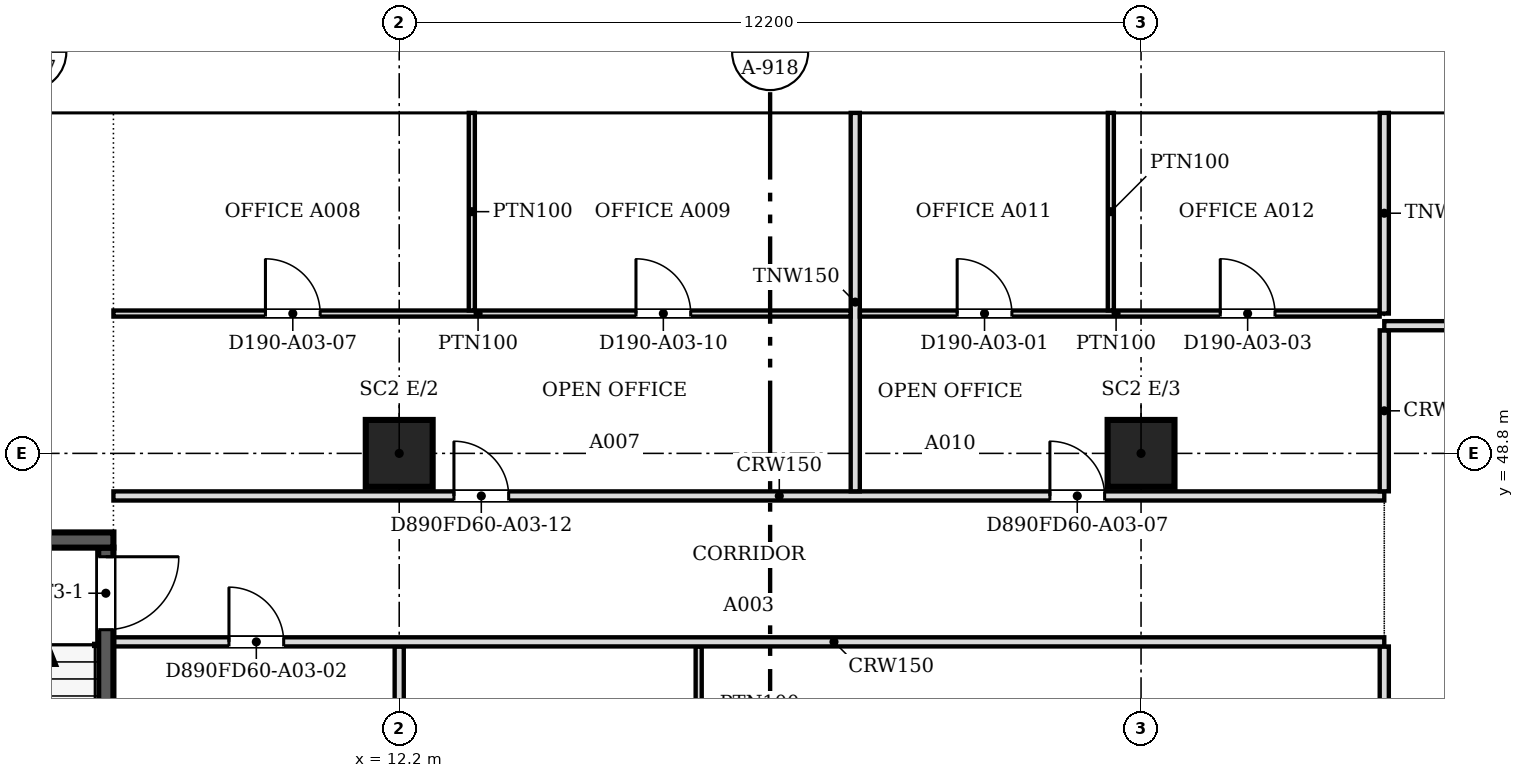
"""IFC4 building model, lengths in metres.
Left out: names, types, materials, properties, quantities, classifications, styles, units other than length and angle.
Written with IfcOpenShell. Run it as: python <this file> out.ifc"""

import sys

from ifc_helpers import new_model, si_unit, direction, frame, frame_2d, origin, origin_2d, place, context, subcontext, project, spatial, polyline, rectangle, outline, extrude, faceted_brep, source, transform, mapped, element, fill, save


model = new_model("IFC4")
c1 = context("Model", 3, precision=1e-05, world=origin(), true_north=direction((0.0, 1.0)))
c2 = subcontext(c1, "Body", "Model", "MODEL_VIEW")
j1 = project(units=[si_unit("LENGTHUNIT", "METRE"), si_unit("PLANEANGLEUNIT", "RADIAN")], contexts=[c1])
p1 = place(None, origin())
s1 = spatial("IfcSite", under=j1, at=p1, CompositionType="ELEMENT")
p2 = place(p1, origin())
s2 = spatial("IfcBuilding", under=s1, at=p2, CompositionType="ELEMENT")
p3 = place(p2, frame((0.0, 0.0, 37.2)))
s3 = spatial("IfcBuildingStorey", under=s2, at=p3, CompositionType="ELEMENT", Elevation=37.2)
for number, where, z_axis, x_axis in (
    (1, (12.2, 48.8, 0.0), (0.0, 0.0, 1.0), (1.0, 0.0, 0.0)),
    (2, (24.4, 48.8, 0.0), (0.0, 0.0, 1.0), (1.0, 0.0, 0.0)),
):
    element("IfcColumn", number, at=place(p3, frame(where, z_axis=z_axis, x_axis=x_axis)), inside=s3, PredefinedType="COLUMN", context=c2, shape_type="SweptSolid", body=[
        extrude(rectangle(XDim=1.1, YDim=1.1, at=origin_2d()), origin(), (0.0, 0.0, 1.0), 3.6),
    ])
m1 = source(origin(), c2, "Body", "SweptSolid", [
    extrude(outline(polyline([(3.05, 0.0), (6.1, 3.8), (3.05, 7.6), (0.0, 3.8), (3.05, 0.0)])), frame((0.0, 0.25, 0.0), z_axis=(0.0, -1.0, 0.0), x_axis=(1.0, 0.0, 0.0)), (0.0, 0.0, 1.0), 0.5),
])
p4 = place(p3, frame((30.5, 54.65, -3.8), z_axis=(0.0, 0.0, 1.0), x_axis=(-1.0, 0.0, 0.0)))
e3 = element("IfcWall", 3, at=p4, inside=s3, PredefinedType="SOLIDWALL", context=c2, shape_type="MappedRepresentation", body=[
    mapped(m1, transform((0.0, 0.0, 0.0), scale=1.0)),
])
m2 = source(origin(), c2, "Body", "SweptSolid", [
    extrude(outline(polyline([(3.05, 0.399), (5.78, 3.8), (3.05, 7.201), (0.321, 3.8), (3.05, 0.399)])), frame((0.0, 0.26, 0.0), z_axis=(0.0, -1.0, 0.0), x_axis=(1.0, 0.0, 0.0)), (0.0, 0.0, 1.0), 0.52),
])
p5 = place(p4, origin())
e4 = element("IfcOpeningElement", 4, at=p5, cuts=e3, PredefinedType="OPENING", context=c2, shape_type="MappedRepresentation", body=[
    mapped(m2, transform((0.0, 0.0, 0.0), scale=1.0)),
])
m3 = source(origin(), c2, "Body", "Brep", [
    faceted_brep([(3.05, -0.25, 0.0), (6.1, -0.25, 3.8), (6.1, -0.25, 3.8), (3.05, -0.25, 7.6), (0.0, -0.25, 3.8), (0.0, 0.25, 3.8), (3.05, 0.25, 7.6), (6.1, 0.25, 3.8), (6.1, 0.25, 3.8), (3.05, 0.25, 0.0)], [[[0, 1, 2, 3, 4]], [[5, 6, 7, 8, 9]], [[9, 8, 1, 0]], [[7, 6, 3, 2]], [[6, 5, 4, 3]], [[5, 9, 0, 4]], [[1, 8, 7, 2]]]),
])
p6 = place(p3, frame((24.4, 54.65, -3.8), z_axis=(0.0, 0.0, 1.0), x_axis=(-1.0, 0.0, 0.0)))
e5 = element("IfcWall", 5, at=p6, inside=s3, PredefinedType="SOLIDWALL", context=c2, shape_type="MappedRepresentation", body=[
    mapped(m3, transform((0.0, 0.0, 0.0), scale=1.0)),
])
p7 = place(p6, origin())
e6 = element("IfcOpeningElement", 6, at=p7, cuts=e5, PredefinedType="OPENING", context=c2, shape_type="MappedRepresentation", body=[
    mapped(m2, transform((0.0, 0.0, 0.0), scale=1.0)),
])
p8 = place(p3, frame((18.3, 54.65, -3.8), z_axis=(0.0, 0.0, 1.0), x_axis=(-1.0, 0.0, 0.0)))
e7 = element("IfcWall", 7, at=p8, inside=s3, PredefinedType="SOLIDWALL", context=c2, shape_type="MappedRepresentation", body=[
    mapped(m1, transform((0.0, 0.0, 0.0), scale=1.0)),
])
p9 = place(p8, origin())
e8 = element("IfcOpeningElement", 8, at=p9, cuts=e7, PredefinedType="OPENING", context=c2, shape_type="MappedRepresentation", body=[
    mapped(m2, transform((0.0, 0.0, 0.0), scale=1.0)),
])
m4 = source(origin(), c2, "Body", "Brep", [
    faceted_brep([(3.05, -0.25, 0.0), (6.053, -0.25, 3.8), (3.05, -0.25, 7.6), (0.0, -0.25, 3.8), (0.0, 0.25, 3.8), (3.05, 0.25, 7.6), (6.007, 0.25, 3.859), (6.007, 0.25, 3.741), (3.05, 0.25, 0.0), (6.053, 0.0, 3.8)], [[[0, 1, 2, 3]], [[4, 5, 6, 7, 8]], [[8, 7, 9, 1, 0]], [[6, 5, 2, 1, 9]], [[5, 4, 3, 2]], [[4, 8, 0, 3]], [[9, 7, 6]]]),
])
p10 = place(p3, frame((12.2, 54.65, -3.8), z_axis=(0.0, 0.0, 1.0), x_axis=(-1.0, 0.0, 0.0)))
e9 = element("IfcWall", 9, at=p10, inside=s3, PredefinedType="SOLIDWALL", context=c2, shape_type="MappedRepresentation", body=[
    mapped(m4, transform((0.0, 0.0, 0.0), scale=1.0)),
])
m5 = source(origin(), c2, "Body", "SweptSolid", [
    extrude(outline(polyline([(3.049, 0.401), (5.735, 3.8), (3.049, 7.199), (0.321, 3.8), (3.049, 0.401)])), frame((0.0, 0.26, 0.0), z_axis=(0.0, -1.0, 0.0), x_axis=(1.0, 0.0, 0.0)), (0.0, 0.0, 1.0), 0.52),
])
p11 = place(p10, origin())
e10 = element("IfcOpeningElement", 10, at=p11, cuts=e9, PredefinedType="OPENING", context=c2, shape_type="MappedRepresentation", body=[
    mapped(m5, transform((0.0, 0.0, 0.0), scale=1.0)),
])
p12 = place(p2, frame((0.0, 0.0, 41.0)))
s4 = spatial("IfcBuildingStorey", under=s2, at=p12, CompositionType="ELEMENT", Elevation=41.0)
p13 = place(p12, frame((33.55, 54.65, -3.8), z_axis=(0.0, 0.0, 1.0), x_axis=(-1.0, 0.0, 0.0)))
e11 = element("IfcWall", 11, at=p13, inside=s4, PredefinedType="SOLIDWALL", context=c2, shape_type="MappedRepresentation", body=[
    mapped(m1, transform((0.0, 0.0, 0.0), scale=1.0)),
])
p14 = place(p13, origin())
e12 = element("IfcOpeningElement", 12, at=p14, cuts=e11, PredefinedType="OPENING", context=c2, shape_type="MappedRepresentation", body=[
    mapped(m2, transform((0.0, 0.0, 0.0), scale=1.0)),
])
p15 = place(p12, frame((27.45, 54.65, -3.8), z_axis=(0.0, 0.0, 1.0), x_axis=(-1.0, 0.0, 0.0)))
e13 = element("IfcWall", 13, at=p15, inside=s4, PredefinedType="SOLIDWALL", context=c2, shape_type="MappedRepresentation", body=[
    mapped(m3, transform((0.0, 0.0, 0.0), scale=1.0)),
])
p16 = place(p15, origin())
e14 = element("IfcOpeningElement", 14, at=p16, cuts=e13, PredefinedType="OPENING", context=c2, shape_type="MappedRepresentation", body=[
    mapped(m2, transform((0.0, 0.0, 0.0), scale=1.0)),
])
p17 = place(p12, frame((21.35, 54.65, -3.8), z_axis=(0.0, 0.0, 1.0), x_axis=(-1.0, 0.0, 0.0)))
e15 = element("IfcWall", 15, at=p17, inside=s4, PredefinedType="SOLIDWALL", context=c2, shape_type="MappedRepresentation", body=[
    mapped(m1, transform((0.0, 0.0, 0.0), scale=1.0)),
])
p18 = place(p17, origin())
e16 = element("IfcOpeningElement", 16, at=p18, cuts=e15, PredefinedType="OPENING", context=c2, shape_type="MappedRepresentation", body=[
    mapped(m2, transform((0.0, 0.0, 0.0), scale=1.0)),
])
p19 = place(p12, frame((15.25, 54.65, -3.8), z_axis=(0.0, 0.0, 1.0), x_axis=(-1.0, 0.0, 0.0)))
e17 = element("IfcWall", 17, at=p19, inside=s4, PredefinedType="SOLIDWALL", context=c2, shape_type="MappedRepresentation", body=[
    mapped(m1, transform((0.0, 0.0, 0.0), scale=1.0)),
])
p20 = place(p19, origin())
e18 = element("IfcOpeningElement", 18, at=p20, cuts=e17, PredefinedType="OPENING", context=c2, shape_type="MappedRepresentation", body=[
    mapped(m2, transform((0.0, 0.0, 0.0), scale=1.0)),
])
m6 = source(origin(), c2, "Body", "Brep", [
    faceted_brep([(3.003, -0.25, 0.0), (3.05, -0.25, 0.06), (3.05, -0.25, 7.54), (3.003, -0.25, 7.6), (0.0, -0.25, 3.8), (0.0, 0.25, 3.8), (2.957, 0.25, 7.541), (2.957, 0.25, 0.059), (3.003, 0.0, 0.0), (3.003, 0.0, 7.6)], [[[0, 1, 2, 3, 4]], [[5, 6, 7]], [[1, 0, 8]], [[9, 3, 2]], [[6, 5, 4, 3, 9]], [[5, 7, 8, 0, 4]], [[1, 8, 7, 6, 9, 2]]]),
])
p21 = place(p12, frame((9.15, 54.65, -3.8), z_axis=(0.0, 0.0, 1.0), x_axis=(-1.0, 0.0, 0.0)))
e19 = element("IfcWall", 19, at=p21, inside=s4, PredefinedType="SOLIDWALL", context=c2, shape_type="MappedRepresentation", body=[
    mapped(m6, transform((0.0, 0.0, 0.0), scale=1.0)),
])
m7 = source(origin(), c2, "Body", "SweptSolid", [
    extrude(outline(polyline([(2.803, 6.944), (0.319, 3.8), (2.803, 0.656), (2.803, 6.944)])), frame((0.0, 0.26, 0.0), z_axis=(0.0, -1.0, 0.0), x_axis=(1.0, 0.0, 0.0)), (0.0, 0.0, 1.0), 0.52),
])
p22 = place(p21, origin())
e20 = element("IfcOpeningElement", 20, at=p22, cuts=e19, PredefinedType="OPENING", context=c2, shape_type="MappedRepresentation", body=[
    mapped(m7, transform((0.0, 0.0, 0.0), scale=1.0)),
])
p23 = place(p3, frame((3.6, 47.375, 0.0), z_axis=(0.0, 0.0, 1.0), x_axis=(1.0, 0.0, 0.0)))
e21 = element("IfcWall", 21, at=p23, inside=s3, PredefinedType="SOLIDWALL", context=c2, shape_type="SweptSolid", body=[
    extrude(rectangle(XDim=3.9, YDim=0.25, at=frame_2d((1.95, 0.0))), origin(), (0.0, 0.0, 1.0), 3.8),
])
p24 = place(p3, frame((7.375, 47.25, 0.0), z_axis=(0.0, 0.0, 1.0), x_axis=(0.0, -1.0, 0.0)))
e22 = element("IfcWall", 22, at=p24, inside=s3, PredefinedType="SOLIDWALL", context=c2, shape_type="SweptSolid", body=[
    extrude(rectangle(XDim=8.0, YDim=0.25, at=frame_2d((4.0, 0.0))), origin(), (0.0, 0.0, 1.0), 3.8),
])
m8 = source(origin(), c2, "Body", "SweptSolid", [
    extrude(rectangle(XDim=1.2, YDim=2.1, at=frame_2d((0.6, 1.05))), frame((0.0, 0.135, 0.0), z_axis=(0.0, -1.0, 0.0), x_axis=(1.0, 0.0, 0.0)), (0.0, 0.0, 1.0), 0.27),
])
p25 = place(p24, frame((0.15, 0.0, 0.0)))
e23 = element("IfcOpeningElement", 23, at=p25, cuts=e22, PredefinedType="OPENING", context=c2, shape_type="MappedRepresentation", body=[
    mapped(m8, transform((0.0, 0.0, 0.0), scale=1.0)),
])
p26 = place(p3, frame((28.4, 18.8, 0.0), z_axis=(0.0, 0.0, 1.0), x_axis=(0.0, 1.0, 0.0)))
e24 = element("IfcWall", 24, at=p26, inside=s3, PredefinedType="PARTITIONING", context=c2, shape_type="SweptSolid", body=[
    extrude(rectangle(XDim=26.824, YDim=0.15, at=frame_2d((13.412, 0.0))), origin(), (0.0, 0.0, 1.0), 3.067),
])
m9 = source(origin(), c2, "Body", "SweptSolid", [
    extrude(rectangle(XDim=0.9, YDim=2.1, at=frame_2d((0.45, 1.05))), frame((0.0, 0.085, 0.0), z_axis=(0.0, -1.0, 0.0), x_axis=(1.0, 0.0, 0.0)), (0.0, 0.0, 1.0), 0.17),
])
p27 = place(p26, frame((1.3, 0.0, 0.0)))
e25 = element("IfcOpeningElement", 25, at=p27, cuts=e24, PredefinedType="OPENING", context=c2, shape_type="MappedRepresentation", body=[
    mapped(m9, transform((0.0, 0.0, 0.0), scale=1.0)),
])
p28 = place(p26, frame((14.301, 0.0, 0.0)))
e26 = element("IfcOpeningElement", 26, at=p28, cuts=e24, PredefinedType="OPENING", context=c2, shape_type="MappedRepresentation", body=[
    mapped(m9, transform((0.0, 0.0, 0.0), scale=1.0)),
])
p29 = place(p26, frame((8.2, 0.0, 0.0)))
e27 = element("IfcOpeningElement", 27, at=p29, cuts=e24, PredefinedType="OPENING", context=c2, shape_type="MappedRepresentation", body=[
    mapped(m9, transform((0.0, 0.0, 0.0), scale=1.0)),
])
p30 = place(p26, frame((21.9, 0.0, 0.0)))
e28 = element("IfcOpeningElement", 28, at=p30, cuts=e24, PredefinedType="OPENING", context=c2, shape_type="MappedRepresentation", body=[
    mapped(m9, transform((0.0, 0.0, 0.0), scale=1.0)),
])
p31 = place(p3, frame((12.2, 37.151, 0.0), z_axis=(0.0, 0.0, 1.0), x_axis=(0.0, 1.0, 0.0)))
e29 = element("IfcWall", 29, at=p31, inside=s3, PredefinedType="PARTITIONING", context=c2, shape_type="SweptSolid", body=[
    extrude(rectangle(XDim=8.473, YDim=0.15, at=frame_2d((4.237, 0.0))), origin(), (0.0, 0.0, 1.0), 3.067),
])
p32 = place(p3, frame((17.125, 41.047, 0.0), z_axis=(0.0, 0.0, 1.0), x_axis=(0.0, 1.0, 0.0)))
e30 = element("IfcWall", 30, at=p32, inside=s3, PredefinedType="PARTITIONING", context=c2, shape_type="SweptSolid", body=[
    extrude(rectangle(XDim=4.577, YDim=0.1, at=frame_2d((2.289, 0.0))), origin(), (0.0, 0.0, 1.0), 3.067),
])
m10 = source(origin(), c2, "Body", "SweptSolid", [
    extrude(rectangle(XDim=0.9, YDim=2.1, at=frame_2d((0.45, 1.05))), frame((0.0, 0.06, 0.0), z_axis=(0.0, -1.0, 0.0), x_axis=(1.0, 0.0, 0.0)), (0.0, 0.0, 1.0), 0.12),
])
p33 = place(p32, frame((1.8, 0.0, 0.0)))
e31 = element("IfcOpeningElement", 31, at=p33, cuts=e30, PredefinedType="OPENING", context=c2, shape_type="MappedRepresentation", body=[
    mapped(m10, transform((0.0, 0.0, 0.0), scale=1.0)),
])
p34 = place(p3, frame((28.4, 45.7, 0.0), z_axis=(0.0, 0.0, 1.0), x_axis=(-1.0, 0.0, 0.0)))
e32 = element("IfcWall", 32, at=p34, inside=s3, PredefinedType="PARTITIONING", context=c2, shape_type="SweptSolid", body=[
    extrude(rectangle(XDim=20.9, YDim=0.15, at=frame_2d((10.45, 0.0))), origin(), (0.0, 0.0, 1.0), 3.067),
])
p35 = place(p34, frame((18.1, 0.0, 0.0)))
e33 = element("IfcOpeningElement", 33, at=p35, cuts=e32, PredefinedType="OPENING", context=c2, shape_type="MappedRepresentation", body=[
    mapped(m9, transform((0.0, 0.0, 0.0), scale=1.0)),
])
p36 = place(p3, frame((7.5, 48.1, 0.0), z_axis=(0.0, 0.0, 1.0), x_axis=(1.0, 0.0, 0.0)))
e34 = element("IfcWall", 34, at=p36, inside=s3, PredefinedType="PARTITIONING", context=c2, shape_type="SweptSolid", body=[
    extrude(rectangle(XDim=20.9, YDim=0.15, at=frame_2d((10.45, 0.0))), origin(), (0.0, 0.0, 1.0), 3.067),
])
p37 = place(p36, frame((15.401, 0.0, 0.0)))
e35 = element("IfcOpeningElement", 35, at=p37, cuts=e34, PredefinedType="OPENING", context=c2, shape_type="MappedRepresentation", body=[
    mapped(m9, transform((0.0, 0.0, 0.0), scale=1.0)),
])
p38 = place(p36, frame((5.6, 0.0, 0.0)))
e36 = element("IfcOpeningElement", 36, at=p38, cuts=e34, PredefinedType="OPENING", context=c2, shape_type="MappedRepresentation", body=[
    mapped(m9, transform((0.0, 0.0, 0.0), scale=1.0)),
])
p39 = place(p3, frame((19.7, 48.176, 0.0), z_axis=(0.0, 0.0, 1.0), x_axis=(0.0, 1.0, 0.0)))
e37 = element("IfcWall", 37, at=p39, inside=s3, PredefinedType="PARTITIONING", context=c2, shape_type="SweptSolid", body=[
    extrude(rectangle(XDim=6.224, YDim=0.15, at=frame_2d((3.112, 0.0))), origin(), (0.0, 0.0, 1.0), 3.067),
])
p40 = place(p3, frame((28.4, 48.176, 0.0), z_axis=(0.0, 0.0, 1.0), x_axis=(0.0, 1.0, 0.0)))
e38 = element("IfcWall", 38, at=p40, inside=s3, PredefinedType="PARTITIONING", context=c2, shape_type="SweptSolid", body=[
    extrude(rectangle(XDim=2.648, YDim=0.15, at=frame_2d((1.324, 0.0))), origin(), (0.0, 0.0, 1.0), 3.067),
])
p41 = place(p3, frame((28.4, 50.9, 0.0), z_axis=(0.0, 0.0, 1.0), x_axis=(1.0, 0.0, 0.0)))
e39 = element("IfcWall", 39, at=p41, inside=s3, PredefinedType="PARTITIONING", context=c2, shape_type="SweptSolid", body=[
    extrude(rectangle(XDim=31.254, YDim=0.15, at=frame_2d((15.627, 0.0))), origin(), (0.0, 0.0, 1.0), 3.067),
])
p42 = place(p41, frame((16.301, 0.0, 0.0)))
e40 = element("IfcOpeningElement", 40, at=p42, cuts=e39, PredefinedType="OPENING", context=c2, shape_type="MappedRepresentation", body=[
    mapped(m9, transform((0.0, 0.0, 0.0), scale=1.0)),
])
p43 = place(p41, frame((25.85, 0.0, 0.0)))
e41 = element("IfcOpeningElement", 41, at=p43, cuts=e39, PredefinedType="OPENING", context=c2, shape_type="MappedRepresentation", body=[
    mapped(m9, transform((0.0, 0.0, 0.0), scale=1.0)),
])
p44 = place(p41, frame((5.6, 0.0, 0.0)))
e42 = element("IfcOpeningElement", 42, at=p44, cuts=e39, PredefinedType="OPENING", context=c2, shape_type="MappedRepresentation", body=[
    mapped(m9, transform((0.0, 0.0, 0.0), scale=1.0)),
])
p45 = place(p3, frame((7.5, 51.1, 0.0), z_axis=(0.0, 0.0, 1.0), x_axis=(1.0, 0.0, 0.0)))
e43 = element("IfcWall", 43, at=p45, inside=s3, PredefinedType="PARTITIONING", context=c2, shape_type="SweptSolid", body=[
    extrude(rectangle(XDim=12.124, YDim=0.1, at=frame_2d((6.062, 0.0))), origin(), (0.0, 0.0, 1.0), 3.067),
])
p46 = place(p45, frame((2.5, 0.0, 0.0)))
e44 = element("IfcOpeningElement", 44, at=p46, cuts=e43, PredefinedType="OPENING", context=c2, shape_type="MappedRepresentation", body=[
    mapped(m10, transform((0.0, 0.0, 0.0), scale=1.0)),
])
p47 = place(p45, frame((8.594, 0.0, 0.0)))
e45 = element("IfcOpeningElement", 45, at=p47, cuts=e43, PredefinedType="OPENING", context=c2, shape_type="MappedRepresentation", body=[
    mapped(m10, transform((0.0, 0.0, 0.0), scale=1.0)),
])
p48 = place(p3, frame((19.776, 51.1, 0.0), z_axis=(0.0, 0.0, 1.0), x_axis=(1.0, 0.0, 0.0)))
e46 = element("IfcWall", 46, at=p48, inside=s3, PredefinedType="PARTITIONING", context=c2, shape_type="SweptSolid", body=[
    extrude(rectangle(XDim=8.548, YDim=0.1, at=frame_2d((4.274, 0.0))), origin(), (0.0, 0.0, 1.0), 3.067),
])
p49 = place(p48, frame((1.6, 0.0, 0.0)))
e47 = element("IfcOpeningElement", 47, at=p49, cuts=e46, PredefinedType="OPENING", context=c2, shape_type="MappedRepresentation", body=[
    mapped(m10, transform((0.0, 0.0, 0.0), scale=1.0)),
])
p50 = place(p48, frame((5.927, 0.0, 0.0)))
e48 = element("IfcOpeningElement", 48, at=p50, cuts=e46, PredefinedType="OPENING", context=c2, shape_type="MappedRepresentation", body=[
    mapped(m10, transform((0.0, 0.0, 0.0), scale=1.0)),
])
p51 = place(p3, frame((28.4, 51.1, 0.0), z_axis=(0.0, 0.0, 1.0), x_axis=(0.0, 1.0, 0.0)))
e49 = element("IfcWall", 49, at=p51, inside=s3, PredefinedType="PARTITIONING", context=c2, shape_type="SweptSolid", body=[
    extrude(rectangle(XDim=3.3, YDim=0.15, at=frame_2d((1.65, 0.0))), origin(), (0.0, 0.0, 1.0), 3.067),
])
for number, where, z_axis, x_axis in (
    (50, (13.394, 51.151, 0.0), (0.0, 0.0, 1.0), (0.0, 1.0, 0.0)),
    (51, (23.903, 51.151, 0.0), (0.0, 0.0, 1.0), (0.0, 1.0, 0.0)),
):
    element("IfcWall", number, at=place(p3, frame(where, z_axis=z_axis, x_axis=x_axis)), inside=s3, PredefinedType="PARTITIONING", context=c2, shape_type="SweptSolid", body=[
        extrude(rectangle(XDim=3.249, YDim=0.1, at=frame_2d((1.625, 0.0))), origin(), (0.0, 0.0, 1.0), 3.067),
    ])
m11 = source(origin(), c2, "Body", "SweptSolid", [
    extrude(rectangle(XDim=1.2, YDim=2.1, at=frame_2d((0.6, 1.05))), frame((0.0, 0.025, 0.0), z_axis=(0.0, -1.0, 0.0), x_axis=(1.0, 0.0, 0.0)), (0.0, 0.0, 1.0), 0.05),
])
p52 = place(p25, origin())
e52 = element("IfcDoor", 52, at=p52, inside=s3, OperationType="SINGLE_SWING_LEFT", PredefinedType="DOOR", context=c2, shape_type="MappedRepresentation", body=[
    mapped(m11, transform((0.0, 0.0, 0.0), scale=1.0)),
])
fill(e23, e52)
m12 = source(origin(), c2, "Body", "SweptSolid", [
    extrude(rectangle(XDim=0.9, YDim=2.1, at=frame_2d((0.45, 1.05))), frame((0.0, 0.025, 0.0), z_axis=(0.0, -1.0, 0.0), x_axis=(1.0, 0.0, 0.0)), (0.0, 0.0, 1.0), 0.05),
])
p53 = place(p49, origin())
e53 = element("IfcDoor", 53, at=p53, inside=s3, OperationType="SINGLE_SWING_LEFT", PredefinedType="DOOR", context=c2, shape_type="MappedRepresentation", body=[
    mapped(m12, transform((0.0, 0.0, 0.0), scale=1.0)),
])
fill(e47, e53)
p54 = place(p50, origin())
e54 = element("IfcDoor", 54, at=p54, inside=s3, OperationType="SINGLE_SWING_LEFT", PredefinedType="DOOR", context=c2, shape_type="MappedRepresentation", body=[
    mapped(m12, transform((0.0, 0.0, 0.0), scale=1.0)),
])
fill(e48, e54)
p55 = place(p35, origin())
e55 = element("IfcDoor", 55, at=p55, inside=s3, OperationType="SINGLE_SWING_RIGHT", PredefinedType="DOOR", context=c2, shape_type="MappedRepresentation", body=[
    mapped(m12, transform((0.0, 0.0, 0.0), scale=1.0)),
])
fill(e33, e55)
p56 = place(p46, origin())
e56 = element("IfcDoor", 56, at=p56, inside=s3, OperationType="SINGLE_SWING_LEFT", PredefinedType="DOOR", context=c2, shape_type="MappedRepresentation", body=[
    mapped(m12, transform((0.0, 0.0, 0.0), scale=1.0)),
])
fill(e44, e56)
p57 = place(p47, origin())
e57 = element("IfcDoor", 57, at=p57, inside=s3, OperationType="SINGLE_SWING_LEFT", PredefinedType="DOOR", context=c2, shape_type="MappedRepresentation", body=[
    mapped(m12, transform((0.0, 0.0, 0.0), scale=1.0)),
])
fill(e45, e57)
p58 = place(p37, origin())
e58 = element("IfcDoor", 58, at=p58, inside=s3, OperationType="SINGLE_SWING_LEFT", PredefinedType="DOOR", context=c2, shape_type="MappedRepresentation", body=[
    mapped(m12, transform((0.0, 0.0, 0.0), scale=1.0)),
])
fill(e35, e58)
p59 = place(p38, origin())
e59 = element("IfcDoor", 59, at=p59, inside=s3, OperationType="SINGLE_SWING_LEFT", PredefinedType="DOOR", context=c2, shape_type="MappedRepresentation", body=[
    mapped(m12, transform((0.0, 0.0, 0.0), scale=1.0)),
])
fill(e36, e59)
save(model, sys.argv[1])
